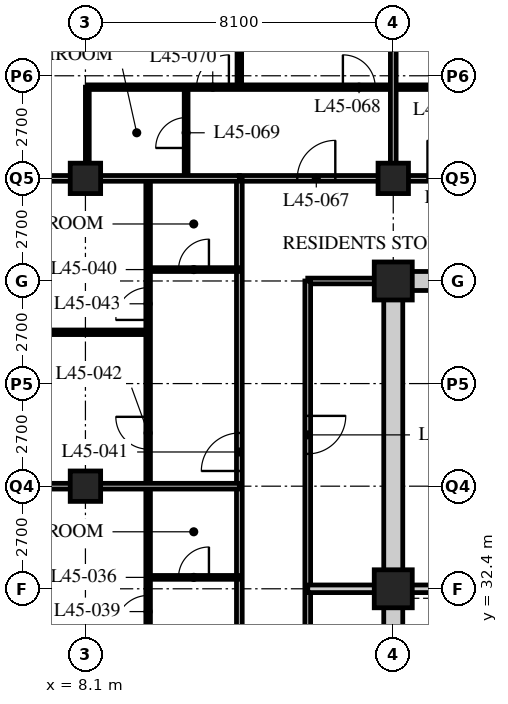
"""IFC4 building model, lengths in metres.
Left out: names, types, materials, properties, quantities, classifications, styles, units other than length and angle.
Written with IfcOpenShell. Run it as: python <this file> out.ifc"""

import sys

from ifc_helpers import new_model, si_unit, direction, frame, frame_2d, origin, origin_2d, place, context, subcontext, project, spatial, rectangle, hollow_rectangle, extrude, element, fill, save


model = new_model("IFC4")
c1 = context("Model", 3, precision=1e-05, world=origin(), true_north=direction((0.0, 1.0)))
c2 = subcontext(c1, "Body", "Model", "MODEL_VIEW")
j1 = project(units=[si_unit("LENGTHUNIT", "METRE"), si_unit("PLANEANGLEUNIT", "RADIAN")], contexts=[c1])
p1 = place(None, origin())
s1 = spatial("IfcSite", under=j1, at=p1, CompositionType="ELEMENT")
p2 = place(p1, origin())
s2 = spatial("IfcBuilding", under=s1, at=p2, CompositionType="ELEMENT")
p3 = place(p2, frame((0.0, 0.0, 177.6)))
s3 = spatial("IfcBuildingStorey", under=s2, at=p3, CompositionType="ELEMENT", Elevation=177.6)
for number, where, z_axis, x_axis in (
    (1, (8.1, 35.1, 0.0), (0.0, 0.0, 1.0), (1.0, 0.0, 0.0)),
    (2, (8.1, 43.2, 0.0), (0.0, 0.0, 1.0), (1.0, 0.0, 0.0)),
):
    element("IfcColumn", number, at=place(p3, frame(where, z_axis=z_axis, x_axis=x_axis)), inside=s3, PredefinedType="COLUMN", context=c2, shape_type="SweptSolid", body=[
        extrude(hollow_rectangle(XDim=0.8, YDim=0.8, WallThickness=0.08, at=origin_2d()), origin(), (0.0, 0.0, 1.0), 3.6),
    ])
for number, where, z_axis, x_axis in (
    (3, (16.2, 32.4, 0.0), (0.0, 0.0, 1.0), (1.0, 0.0, 0.0)),
    (4, (16.2, 40.5, 0.0), (0.0, 0.0, 1.0), (1.0, 0.0, 0.0)),
):
    element("IfcColumn", number, at=place(p3, frame(where, z_axis=z_axis, x_axis=x_axis)), inside=s3, PredefinedType="COLUMN", context=c2, shape_type="SweptSolid", body=[
        extrude(hollow_rectangle(XDim=1.0, YDim=1.0, WallThickness=0.1, at=origin_2d()), origin(), (0.0, 0.0, 1.0), 3.6),
    ])
p4 = place(p3, frame((16.2, 43.2, 0.0), z_axis=(0.0, 0.0, 1.0), x_axis=(1.0, 0.0, 0.0)))
e5 = element("IfcColumn", 5, at=p4, inside=s3, PredefinedType="COLUMN", context=c2, shape_type="SweptSolid", body=[
    extrude(hollow_rectangle(XDim=0.8, YDim=0.8, WallThickness=0.08, at=origin_2d()), origin(), (0.0, 0.0, 1.0), 3.6),
])
p5 = place(p3, frame((12.15, 43.2, 0.0), z_axis=(0.0, 0.0, 1.0), x_axis=(1.0, 0.0, 0.0)))
e6 = element("IfcWall", 6, at=p5, inside=s3, PredefinedType="PARTITIONING", context=c2, shape_type="SweptSolid", body=[
    extrude(rectangle(XDim=32.4, YDim=0.15, at=frame_2d((16.2, 0.0))), origin(), (0.0, 0.0, 1.0), 2.778),
])
p6 = place(p5, frame((4.95, 0.0, 0.0)))
e7 = element("IfcOpeningElement", 7, at=p6, cuts=e6, PredefinedType="OPENING", context=c2, shape_type="SweptSolid", body=[
    extrude(rectangle(XDim=1.0, YDim=2.1, at=frame_2d((0.5, 1.05))), frame((0.0, 0.085, 0.0), z_axis=(0.0, -1.0, 0.0), x_axis=(1.0, 0.0, 0.0)), (0.0, 0.0, 1.0), 0.17),
])
p7 = place(p5, frame((13.05, 0.0, 0.0)))
e8 = element("IfcOpeningElement", 8, at=p7, cuts=e6, PredefinedType="OPENING", context=c2, shape_type="SweptSolid", body=[
    extrude(rectangle(XDim=1.0, YDim=2.1, at=frame_2d((0.5, 1.05))), frame((0.0, 0.085, 0.0), z_axis=(0.0, -1.0, 0.0), x_axis=(1.0, 0.0, 0.0)), (0.0, 0.0, 1.0), 0.17),
])
p8 = place(p5, frame((21.15, 0.0, 0.0)))
e9 = element("IfcOpeningElement", 9, at=p8, cuts=e6, PredefinedType="OPENING", context=c2, shape_type="SweptSolid", body=[
    extrude(rectangle(XDim=1.0, YDim=2.1, at=frame_2d((0.5, 1.05))), frame((0.0, 0.085, 0.0), z_axis=(0.0, -1.0, 0.0), x_axis=(1.0, 0.0, 0.0)), (0.0, 0.0, 1.0), 0.17),
])
p9 = place(p5, frame((29.875, 0.0, 0.0)))
e10 = element("IfcOpeningElement", 10, at=p9, cuts=e6, PredefinedType="OPENING", context=c2, shape_type="SweptSolid", body=[
    extrude(rectangle(XDim=1.0, YDim=2.1, at=frame_2d((0.5, 1.05))), frame((0.0, 0.085, 0.0), z_axis=(0.0, -1.0, 0.0), x_axis=(1.0, 0.0, 0.0)), (0.0, 0.0, 1.0), 0.17),
])
p10 = place(p5, frame((1.525, 0.0, 0.0)))
e11 = element("IfcOpeningElement", 11, at=p10, cuts=e6, PredefinedType="OPENING", context=c2, shape_type="SweptSolid", body=[
    extrude(rectangle(XDim=1.0, YDim=2.1, at=frame_2d((0.5, 1.05))), frame((0.0, 0.085, 0.0), z_axis=(0.0, -1.0, 0.0), x_axis=(1.0, 0.0, 0.0)), (0.0, 0.0, 1.0), 0.17),
])
p11 = place(p3, frame((12.15, 18.9, 0.0), z_axis=(0.0, 0.0, 1.0), x_axis=(0.0, 1.0, 0.0)))
e12 = element("IfcWall", 12, at=p11, inside=s3, PredefinedType="PARTITIONING", context=c2, shape_type="SweptSolid", body=[
    extrude(rectangle(XDim=24.3, YDim=0.15, at=frame_2d((12.15, 0.0))), origin(), (0.0, 0.0, 1.0), 3.39),
])
p12 = place(p11, frame((2.35, 0.0, 0.0)))
e13 = element("IfcOpeningElement", 13, at=p12, cuts=e12, PredefinedType="OPENING", context=c2, shape_type="SweptSolid", body=[
    extrude(rectangle(XDim=1.0, YDim=2.1, at=frame_2d((0.5, 1.05))), frame((0.0, 0.085, 0.0), z_axis=(0.0, -1.0, 0.0), x_axis=(1.0, 0.0, 0.0)), (0.0, 0.0, 1.0), 0.17),
])
p13 = place(p11, frame((6.4, 0.0, 0.0)))
e14 = element("IfcOpeningElement", 14, at=p13, cuts=e12, PredefinedType="OPENING", context=c2, shape_type="SweptSolid", body=[
    extrude(rectangle(XDim=1.0, YDim=2.1, at=frame_2d((0.5, 1.05))), frame((0.0, 0.085, 0.0), z_axis=(0.0, -1.0, 0.0), x_axis=(1.0, 0.0, 0.0)), (0.0, 0.0, 1.0), 0.17),
])
p14 = place(p11, frame((8.5, 0.0, 0.0)))
e15 = element("IfcOpeningElement", 15, at=p14, cuts=e12, PredefinedType="OPENING", context=c2, shape_type="SweptSolid", body=[
    extrude(rectangle(XDim=1.0, YDim=2.1, at=frame_2d((0.5, 1.05))), frame((0.0, 0.085, 0.0), z_axis=(0.0, -1.0, 0.0), x_axis=(1.0, 0.0, 0.0)), (0.0, 0.0, 1.0), 0.17),
])
p15 = place(p11, frame((16.6, 0.0, 0.0)))
e16 = element("IfcOpeningElement", 16, at=p15, cuts=e12, PredefinedType="OPENING", context=c2, shape_type="SweptSolid", body=[
    extrude(rectangle(XDim=1.0, YDim=2.1, at=frame_2d((0.5, 1.05))), frame((0.0, 0.085, 0.0), z_axis=(0.0, -1.0, 0.0), x_axis=(1.0, 0.0, 0.0)), (0.0, 0.0, 1.0), 0.17),
])
p16 = place(p3, frame((16.0, 40.5, 0.0), z_axis=(0.0, 0.0, 1.0), x_axis=(-1.0, 0.0, 0.0)))
e17 = element("IfcWall", 17, at=p16, inside=s3, PredefinedType="PARTITIONING", context=c2, shape_type="SweptSolid", body=[
    extrude(rectangle(XDim=2.05, YDim=0.15, at=frame_2d((1.025, 0.0))), origin(), (0.0, 0.0, 1.0), 3.39),
])
p17 = place(p3, frame((13.95, 40.5, 0.0), z_axis=(0.0, 0.0, 1.0), x_axis=(0.0, -1.0, 0.0)))
e18 = element("IfcWall", 18, at=p17, inside=s3, PredefinedType="PARTITIONING", context=c2, shape_type="SweptSolid", body=[
    extrude(rectangle(XDim=19.8, YDim=0.15, at=frame_2d((9.9, 0.0))), origin(), (0.0, 0.0, 1.0), 3.39),
])
p18 = place(p17, frame((11.65, 0.0, 0.0)))
e19 = element("IfcOpeningElement", 19, at=p18, cuts=e18, PredefinedType="OPENING", context=c2, shape_type="SweptSolid", body=[
    extrude(rectangle(XDim=1.0, YDim=2.1, at=frame_2d((0.5, 1.05))), frame((0.0, 0.085, 0.0), z_axis=(0.0, -1.0, 0.0), x_axis=(1.0, 0.0, 0.0)), (0.0, 0.0, 1.0), 0.17),
])
p19 = place(p17, frame((3.55, 0.0, 0.0)))
e20 = element("IfcOpeningElement", 20, at=p19, cuts=e18, PredefinedType="OPENING", context=c2, shape_type="SweptSolid", body=[
    extrude(rectangle(XDim=1.0, YDim=2.1, at=frame_2d((0.5, 1.05))), frame((0.0, 0.085, 0.0), z_axis=(0.0, -1.0, 0.0), x_axis=(1.0, 0.0, 0.0)), (0.0, 0.0, 1.0), 0.17),
])
p20 = place(p3, frame((13.95, 32.4, 0.0), z_axis=(0.0, 0.0, 1.0), x_axis=(1.0, 0.0, 0.0)))
e21 = element("IfcWall", 21, at=p20, inside=s3, PredefinedType="SOLIDWALL", context=c2, shape_type="SweptSolid", body=[
    extrude(rectangle(XDim=2.25, YDim=0.2, at=frame_2d((1.125, 0.0))), origin(), (0.0, 0.0, 1.0), 3.39),
])
p21 = place(p3, frame((9.75, 27.0, 0.0), z_axis=(0.0, 0.0, 1.0), x_axis=(0.0, 1.0, 0.0)))
e22 = element("IfcWall", 22, at=p21, inside=s3, PredefinedType="PARTITIONING", context=c2, shape_type="SweptSolid", body=[
    extrude(rectangle(XDim=16.2, YDim=0.12, at=frame_2d((8.1, 0.0))), origin(), (0.0, 0.0, 1.0), 3.39),
])
p22 = place(p21, frame((0.975, 0.0, 0.0)))
e23 = element("IfcOpeningElement", 23, at=p22, cuts=e22, PredefinedType="OPENING", context=c2, shape_type="SweptSolid", body=[
    extrude(rectangle(XDim=0.85, YDim=2.1, at=frame_2d((0.425, 1.05))), frame((0.0, 0.07, 0.0), z_axis=(0.0, -1.0, 0.0), x_axis=(1.0, 0.0, 0.0)), (0.0, 0.0, 1.0), 0.14),
])
p23 = place(p21, frame((4.375, 0.0, 0.0)))
e24 = element("IfcOpeningElement", 24, at=p23, cuts=e22, PredefinedType="OPENING", context=c2, shape_type="SweptSolid", body=[
    extrude(rectangle(XDim=0.85, YDim=2.1, at=frame_2d((0.425, 1.05))), frame((0.0, 0.07, 0.0), z_axis=(0.0, -1.0, 0.0), x_axis=(1.0, 0.0, 0.0)), (0.0, 0.0, 1.0), 0.14),
])
p24 = place(p21, frame((9.075, 0.0, 0.0)))
e25 = element("IfcOpeningElement", 25, at=p24, cuts=e22, PredefinedType="OPENING", context=c2, shape_type="SweptSolid", body=[
    extrude(rectangle(XDim=0.85, YDim=2.1, at=frame_2d((0.425, 1.05))), frame((0.0, 0.07, 0.0), z_axis=(0.0, -1.0, 0.0), x_axis=(1.0, 0.0, 0.0)), (0.0, 0.0, 1.0), 0.14),
])
p25 = place(p21, frame((12.475, 0.0, 0.0)))
e26 = element("IfcOpeningElement", 26, at=p25, cuts=e22, PredefinedType="OPENING", context=c2, shape_type="SweptSolid", body=[
    extrude(rectangle(XDim=0.85, YDim=2.1, at=frame_2d((0.425, 1.05))), frame((0.0, 0.07, 0.0), z_axis=(0.0, -1.0, 0.0), x_axis=(1.0, 0.0, 0.0)), (0.0, 0.0, 1.0), 0.14),
])
p26 = place(p3, frame((12.15, 32.7, 0.0), z_axis=(0.0, 0.0, 1.0), x_axis=(-1.0, 0.0, 0.0)))
e27 = element("IfcWall", 27, at=p26, inside=s3, PredefinedType="PARTITIONING", context=c2, shape_type="SweptSolid", body=[
    extrude(rectangle(XDim=2.4, YDim=0.1, at=frame_2d((1.2, 0.0))), origin(), (0.0, 0.0, 1.0), 3.39),
])
p27 = place(p26, frame((0.8, 0.0, 0.0)))
e28 = element("IfcOpeningElement", 28, at=p27, cuts=e27, PredefinedType="OPENING", context=c2, shape_type="SweptSolid", body=[
    extrude(rectangle(XDim=0.8, YDim=2.1, at=frame_2d((0.4, 1.05))), frame((0.0, 0.06, 0.0), z_axis=(0.0, -1.0, 0.0), x_axis=(1.0, 0.0, 0.0)), (0.0, 0.0, 1.0), 0.12),
])
p28 = place(p3, frame((12.15, 35.1, 0.0), z_axis=(0.0, 0.0, 1.0), x_axis=(-1.0, 0.0, 0.0)))
e29 = element("IfcWall", 29, at=p28, inside=s3, PredefinedType="PARTITIONING", context=c2, shape_type="SweptSolid", body=[
    extrude(rectangle(XDim=11.85, YDim=0.15, at=frame_2d((5.925, 0.0))), origin(), (0.0, 0.0, 1.0), 2.778),
])
p29 = place(p3, frame((12.15, 40.8, 0.0), z_axis=(0.0, 0.0, 1.0), x_axis=(-1.0, 0.0, 0.0)))
e30 = element("IfcWall", 30, at=p29, inside=s3, PredefinedType="PARTITIONING", context=c2, shape_type="SweptSolid", body=[
    extrude(rectangle(XDim=2.4, YDim=0.1, at=frame_2d((1.2, 0.0))), origin(), (0.0, 0.0, 1.0), 3.39),
])
p30 = place(p29, frame((0.8, 0.0, 0.0)))
e31 = element("IfcOpeningElement", 31, at=p30, cuts=e30, PredefinedType="OPENING", context=c2, shape_type="SweptSolid", body=[
    extrude(rectangle(XDim=0.8, YDim=2.1, at=frame_2d((0.4, 1.05))), frame((0.0, 0.06, 0.0), z_axis=(0.0, -1.0, 0.0), x_axis=(1.0, 0.0, 0.0)), (0.0, 0.0, 1.0), 0.12),
])
p31 = place(p3, frame((9.75, 39.15, 0.0), z_axis=(0.0, 0.0, 1.0), x_axis=(-1.0, 0.0, 0.0)))
e32 = element("IfcWall", 32, at=p31, inside=s3, PredefinedType="PARTITIONING", context=c2, shape_type="SweptSolid", body=[
    extrude(rectangle(XDim=9.45, YDim=0.12, at=frame_2d((4.725, 0.0))), origin(), (0.0, 0.0, 1.0), 3.39),
])
p32 = place(p3, frame((10.75, 43.2, 0.0), z_axis=(0.0, 0.0, 1.0), x_axis=(0.0, 1.0, 0.0)))
e33 = element("IfcWall", 33, at=p32, inside=s3, PredefinedType="PARTITIONING", context=c2, shape_type="SweptSolid", body=[
    extrude(rectangle(XDim=2.4, YDim=0.1, at=frame_2d((1.2, 0.0))), origin(), (0.0, 0.0, 1.0), 3.39),
])
p33 = place(p32, frame((0.8, 0.0, 0.0)))
e34 = element("IfcOpeningElement", 34, at=p33, cuts=e33, PredefinedType="OPENING", context=c2, shape_type="SweptSolid", body=[
    extrude(rectangle(XDim=0.8, YDim=2.1, at=frame_2d((0.4, 1.05))), frame((0.0, 0.06, 0.0), z_axis=(0.0, -1.0, 0.0), x_axis=(1.0, 0.0, 0.0)), (0.0, 0.0, 1.0), 0.12),
])
p34 = place(p3, frame((8.15, 43.2, 0.0), z_axis=(0.0, 0.0, 1.0), x_axis=(0.0, 1.0, 0.0)))
e35 = element("IfcWall", 35, at=p34, inside=s3, PredefinedType="PARTITIONING", context=c2, shape_type="SweptSolid", body=[
    extrude(rectangle(XDim=2.4, YDim=0.1, at=frame_2d((1.2, 0.0))), origin(), (0.0, 0.0, 1.0), 2.778),
])
p35 = place(p3, frame((8.15, 45.6, 0.0), z_axis=(0.0, 0.0, 1.0), x_axis=(1.0, 0.0, 0.0)))
e36 = element("IfcWall", 36, at=p35, inside=s3, PredefinedType="PARTITIONING", context=c2, shape_type="SweptSolid", body=[
    extrude(rectangle(XDim=40.4, YDim=0.12, at=frame_2d((20.2, 0.0))), origin(), (0.0, 0.0, 1.0), 3.39),
])
p36 = place(p35, frame((9.025, 0.0, 0.0)))
e37 = element("IfcOpeningElement", 37, at=p36, cuts=e36, PredefinedType="OPENING", context=c2, shape_type="SweptSolid", body=[
    extrude(rectangle(XDim=0.85, YDim=2.1, at=frame_2d((0.425, 1.05))), frame((0.0, 0.07, 0.0), z_axis=(0.0, -1.0, 0.0), x_axis=(1.0, 0.0, 0.0)), (0.0, 0.0, 1.0), 0.14),
])
p37 = place(p35, frame((12.425, 0.0, 0.0)))
e38 = element("IfcOpeningElement", 38, at=p37, cuts=e36, PredefinedType="OPENING", context=c2, shape_type="SweptSolid", body=[
    extrude(rectangle(XDim=0.85, YDim=2.1, at=frame_2d((0.425, 1.05))), frame((0.0, 0.07, 0.0), z_axis=(0.0, -1.0, 0.0), x_axis=(1.0, 0.0, 0.0)), (0.0, 0.0, 1.0), 0.14),
])
p38 = place(p35, frame((17.125, 0.0, 0.0)))
e39 = element("IfcOpeningElement", 39, at=p38, cuts=e36, PredefinedType="OPENING", context=c2, shape_type="SweptSolid", body=[
    extrude(rectangle(XDim=0.85, YDim=2.1, at=frame_2d((0.425, 1.05))), frame((0.0, 0.07, 0.0), z_axis=(0.0, -1.0, 0.0), x_axis=(1.0, 0.0, 0.0)), (0.0, 0.0, 1.0), 0.14),
])
p39 = place(p35, frame((20.525, 0.0, 0.0)))
e40 = element("IfcOpeningElement", 40, at=p39, cuts=e36, PredefinedType="OPENING", context=c2, shape_type="SweptSolid", body=[
    extrude(rectangle(XDim=0.85, YDim=2.1, at=frame_2d((0.425, 1.05))), frame((0.0, 0.07, 0.0), z_axis=(0.0, -1.0, 0.0), x_axis=(1.0, 0.0, 0.0)), (0.0, 0.0, 1.0), 0.14),
])
p40 = place(p35, frame((25.225, 0.0, 0.0)))
e41 = element("IfcOpeningElement", 41, at=p40, cuts=e36, PredefinedType="OPENING", context=c2, shape_type="SweptSolid", body=[
    extrude(rectangle(XDim=0.85, YDim=2.1, at=frame_2d((0.425, 1.05))), frame((0.0, 0.07, 0.0), z_axis=(0.0, -1.0, 0.0), x_axis=(1.0, 0.0, 0.0)), (0.0, 0.0, 1.0), 0.14),
])
p41 = place(p35, frame((28.625, 0.0, 0.0)))
e42 = element("IfcOpeningElement", 42, at=p41, cuts=e36, PredefinedType="OPENING", context=c2, shape_type="SweptSolid", body=[
    extrude(rectangle(XDim=0.85, YDim=2.1, at=frame_2d((0.425, 1.05))), frame((0.0, 0.07, 0.0), z_axis=(0.0, -1.0, 0.0), x_axis=(1.0, 0.0, 0.0)), (0.0, 0.0, 1.0), 0.14),
])
p42 = place(p35, frame((32.825, 0.0, 0.0)))
e43 = element("IfcOpeningElement", 43, at=p42, cuts=e36, PredefinedType="OPENING", context=c2, shape_type="SweptSolid", body=[
    extrude(rectangle(XDim=0.85, YDim=2.1, at=frame_2d((0.425, 1.05))), frame((0.0, 0.07, 0.0), z_axis=(0.0, -1.0, 0.0), x_axis=(1.0, 0.0, 0.0)), (0.0, 0.0, 1.0), 0.14),
])
p43 = place(p35, frame((36.675, 0.0, 0.0)))
e44 = element("IfcOpeningElement", 44, at=p43, cuts=e36, PredefinedType="OPENING", context=c2, shape_type="SweptSolid", body=[
    extrude(rectangle(XDim=0.85, YDim=2.1, at=frame_2d((0.425, 1.05))), frame((0.0, 0.07, 0.0), z_axis=(0.0, -1.0, 0.0), x_axis=(1.0, 0.0, 0.0)), (0.0, 0.0, 1.0), 0.14),
])
p44 = place(p35, frame((6.725, 0.0, 0.0)))
e45 = element("IfcOpeningElement", 45, at=p44, cuts=e36, PredefinedType="OPENING", context=c2, shape_type="SweptSolid", body=[
    extrude(rectangle(XDim=0.85, YDim=2.1, at=frame_2d((0.425, 1.05))), frame((0.0, 0.07, 0.0), z_axis=(0.0, -1.0, 0.0), x_axis=(1.0, 0.0, 0.0)), (0.0, 0.0, 1.0), 0.14),
])
p45 = place(p35, frame((2.875, 0.0, 0.0)))
e46 = element("IfcOpeningElement", 46, at=p45, cuts=e36, PredefinedType="OPENING", context=c2, shape_type="SweptSolid", body=[
    extrude(rectangle(XDim=0.85, YDim=2.1, at=frame_2d((0.425, 1.05))), frame((0.0, 0.07, 0.0), z_axis=(0.0, -1.0, 0.0), x_axis=(1.0, 0.0, 0.0)), (0.0, 0.0, 1.0), 0.14),
])
p46 = place(p3, frame((12.15, 45.6, 0.0), z_axis=(0.0, 0.0, 1.0), x_axis=(0.0, 1.0, 0.0)))
e47 = element("IfcWall", 47, at=p46, inside=s3, PredefinedType="PARTITIONING", context=c2, shape_type="SweptSolid", body=[
    extrude(rectangle(XDim=13.5, YDim=0.12, at=frame_2d((6.75, 0.0))), origin(), (0.0, 0.0, 1.0), 3.39),
])
p47 = place(p3, frame((0.3, 43.2, 0.0), z_axis=(0.0, 0.0, 1.0), x_axis=(1.0, 0.0, 0.0)))
e48 = element("IfcWall", 48, at=p47, inside=s3, PredefinedType="PARTITIONING", context=c2, shape_type="SweptSolid", body=[
    extrude(rectangle(XDim=11.85, YDim=0.15, at=frame_2d((5.925, 0.0))), origin(), (0.0, 0.0, 1.0), 2.778),
])
p48 = place(p3, frame((16.2, 43.2, 0.0), z_axis=(0.0, 0.0, 1.0), x_axis=(0.0, 1.0, 0.0)))
e49 = element("IfcWall", 49, at=p48, inside=s3, PredefinedType="PARTITIONING", context=c2, shape_type="SweptSolid", body=[
    extrude(rectangle(XDim=15.9, YDim=0.15, at=frame_2d((7.95, 0.0))), origin(), (0.0, 0.0, 1.0), 2.778),
])
p49 = place(p3, frame((15.95, 40.5, 0.0), z_axis=(0.0, 0.0, 1.0), x_axis=(1.0, 0.0, 0.0)))
e50 = element("IfcWall", 50, at=p49, inside=s3, PredefinedType="SOLIDWALL", context=c2, shape_type="SweptSolid", body=[
    extrude(rectangle(XDim=24.8, YDim=0.5, at=frame_2d((12.4, 0.0))), origin(), (0.0, 0.0, 1.0), 2.74),
])
p50 = place(p49, frame((11.5, 0.0, 0.0)))
e51 = element("IfcOpeningElement", 51, at=p50, cuts=e50, PredefinedType="OPENING", context=c2, shape_type="SweptSolid", body=[
    extrude(rectangle(XDim=1.8, YDim=2.4, at=frame_2d((0.9, 1.2))), frame((0.0, 0.26, 0.0), z_axis=(0.0, -1.0, 0.0), x_axis=(1.0, 0.0, 0.0)), (0.0, 0.0, 1.0), 0.52),
])
p51 = place(p3, frame((16.2, 24.55, 0.0), z_axis=(0.0, 0.0, 1.0), x_axis=(0.0, 1.0, 0.0)))
e52 = element("IfcWall", 52, at=p51, inside=s3, PredefinedType="SOLIDWALL", context=c2, shape_type="SweptSolid", body=[
    extrude(rectangle(XDim=15.7, YDim=0.5, at=frame_2d((7.85, 0.0))), origin(), (0.0, 0.0, 1.0), 2.778),
])
p52 = place(p3, frame((16.45, 32.4, 0.0), z_axis=(0.0, 0.0, 1.0), x_axis=(1.0, 0.0, 0.0)))
e53 = element("IfcWall", 53, at=p52, inside=s3, PredefinedType="SOLIDWALL", context=c2, shape_type="SweptSolid", body=[
    extrude(rectangle(XDim=7.95, YDim=0.2, at=frame_2d((3.975, 0.0))), origin(), (0.0, 0.0, 1.0), 2.778),
])
p53 = place(p19, origin())
e54 = element("IfcDoor", 54, at=p53, inside=s3, OperationType="SINGLE_SWING_LEFT", PredefinedType="DOOR", context=c2, shape_type="SweptSolid", body=[
    extrude(rectangle(XDim=1.0, YDim=2.1, at=frame_2d((0.5, 1.05))), frame((0.0, 0.025, 0.0), z_axis=(0.0, -1.0, 0.0), x_axis=(1.0, 0.0, 0.0)), (0.0, 0.0, 1.0), 0.05),
])
fill(e20, e54)
p54 = place(p6, origin())
e55 = element("IfcDoor", 55, at=p54, inside=s3, OperationType="SINGLE_SWING_LEFT", PredefinedType="DOOR", context=c2, shape_type="SweptSolid", body=[
    extrude(rectangle(XDim=1.0, YDim=2.1, at=frame_2d((0.5, 1.05))), frame((0.0, 0.025, 0.0), z_axis=(0.0, -1.0, 0.0), x_axis=(1.0, 0.0, 0.0)), (0.0, 0.0, 1.0), 0.05),
])
fill(e7, e55)
p55 = place(p27, origin())
e56 = element("IfcDoor", 56, at=p55, inside=s3, OperationType="SINGLE_SWING_RIGHT", PredefinedType="DOOR", context=c2, shape_type="SweptSolid", body=[
    extrude(rectangle(XDim=0.8, YDim=2.1, at=frame_2d((0.4, 1.05))), frame((0.0, 0.025, 0.0), z_axis=(0.0, -1.0, 0.0), x_axis=(1.0, 0.0, 0.0)), (0.0, 0.0, 1.0), 0.05),
])
fill(e28, e56)
p56 = place(p23, origin())
e57 = element("IfcDoor", 57, at=p56, inside=s3, OperationType="SINGLE_SWING_LEFT", PredefinedType="DOOR", context=c2, shape_type="SweptSolid", body=[
    extrude(rectangle(XDim=0.85, YDim=2.1, at=frame_2d((0.425, 1.05))), frame((0.0, 0.025, 0.0), z_axis=(0.0, -1.0, 0.0), x_axis=(1.0, 0.0, 0.0)), (0.0, 0.0, 1.0), 0.05),
])
fill(e24, e57)
p57 = place(p30, origin())
e58 = element("IfcDoor", 58, at=p57, inside=s3, OperationType="SINGLE_SWING_RIGHT", PredefinedType="DOOR", context=c2, shape_type="SweptSolid", body=[
    extrude(rectangle(XDim=0.8, YDim=2.1, at=frame_2d((0.4, 1.05))), frame((0.0, 0.025, 0.0), z_axis=(0.0, -1.0, 0.0), x_axis=(1.0, 0.0, 0.0)), (0.0, 0.0, 1.0), 0.05),
])
fill(e31, e58)
p58 = place(p15, origin())
e59 = element("IfcDoor", 59, at=p58, inside=s3, OperationType="SINGLE_SWING_LEFT", PredefinedType="DOOR", context=c2, shape_type="SweptSolid", body=[
    extrude(rectangle(XDim=1.0, YDim=2.1, at=frame_2d((0.5, 1.05))), frame((0.0, 0.025, 0.0), z_axis=(0.0, -1.0, 0.0), x_axis=(1.0, 0.0, 0.0)), (0.0, 0.0, 1.0), 0.05),
])
fill(e16, e59)
p59 = place(p24, origin())
e60 = element("IfcDoor", 60, at=p59, inside=s3, OperationType="SINGLE_SWING_RIGHT", PredefinedType="DOOR", context=c2, shape_type="SweptSolid", body=[
    extrude(rectangle(XDim=0.85, YDim=2.1, at=frame_2d((0.425, 1.05))), frame((0.0, 0.025, 0.0), z_axis=(0.0, -1.0, 0.0), x_axis=(1.0, 0.0, 0.0)), (0.0, 0.0, 1.0), 0.05),
])
fill(e25, e60)
p60 = place(p25, origin())
e61 = element("IfcDoor", 61, at=p60, inside=s3, OperationType="SINGLE_SWING_LEFT", PredefinedType="DOOR", context=c2, shape_type="SweptSolid", body=[
    extrude(rectangle(XDim=0.85, YDim=2.1, at=frame_2d((0.425, 1.05))), frame((0.0, 0.025, 0.0), z_axis=(0.0, -1.0, 0.0), x_axis=(1.0, 0.0, 0.0)), (0.0, 0.0, 1.0), 0.05),
])
fill(e26, e61)
p61 = place(p10, origin())
e62 = element("IfcDoor", 62, at=p61, inside=s3, OperationType="SINGLE_SWING_RIGHT", PredefinedType="DOOR", context=c2, shape_type="SweptSolid", body=[
    extrude(rectangle(XDim=1.0, YDim=2.1, at=frame_2d((0.5, 1.05))), frame((0.0, 0.025, 0.0), z_axis=(0.0, -1.0, 0.0), x_axis=(1.0, 0.0, 0.0)), (0.0, 0.0, 1.0), 0.05),
])
fill(e11, e62)
p62 = place(p44, origin())
e63 = element("IfcDoor", 63, at=p62, inside=s3, OperationType="SINGLE_SWING_LEFT", PredefinedType="DOOR", context=c2, shape_type="SweptSolid", body=[
    extrude(rectangle(XDim=0.85, YDim=2.1, at=frame_2d((0.425, 1.05))), frame((0.0, 0.025, 0.0), z_axis=(0.0, -1.0, 0.0), x_axis=(1.0, 0.0, 0.0)), (0.0, 0.0, 1.0), 0.05),
])
fill(e45, e63)
p63 = place(p33, origin())
e64 = element("IfcDoor", 64, at=p63, inside=s3, OperationType="SINGLE_SWING_LEFT", PredefinedType="DOOR", context=c2, shape_type="SweptSolid", body=[
    extrude(rectangle(XDim=0.8, YDim=2.1, at=frame_2d((0.4, 1.05))), frame((0.0, 0.025, 0.0), z_axis=(0.0, -1.0, 0.0), x_axis=(1.0, 0.0, 0.0)), (0.0, 0.0, 1.0), 0.05),
])
fill(e34, e64)
p64 = place(p45, origin())
e65 = element("IfcDoor", 65, at=p64, inside=s3, OperationType="SINGLE_SWING_RIGHT", PredefinedType="DOOR", context=c2, shape_type="SweptSolid", body=[
    extrude(rectangle(XDim=0.85, YDim=2.1, at=frame_2d((0.425, 1.05))), frame((0.0, 0.025, 0.0), z_axis=(0.0, -1.0, 0.0), x_axis=(1.0, 0.0, 0.0)), (0.0, 0.0, 1.0), 0.05),
])
fill(e46, e65)
save(model, sys.argv[1])
